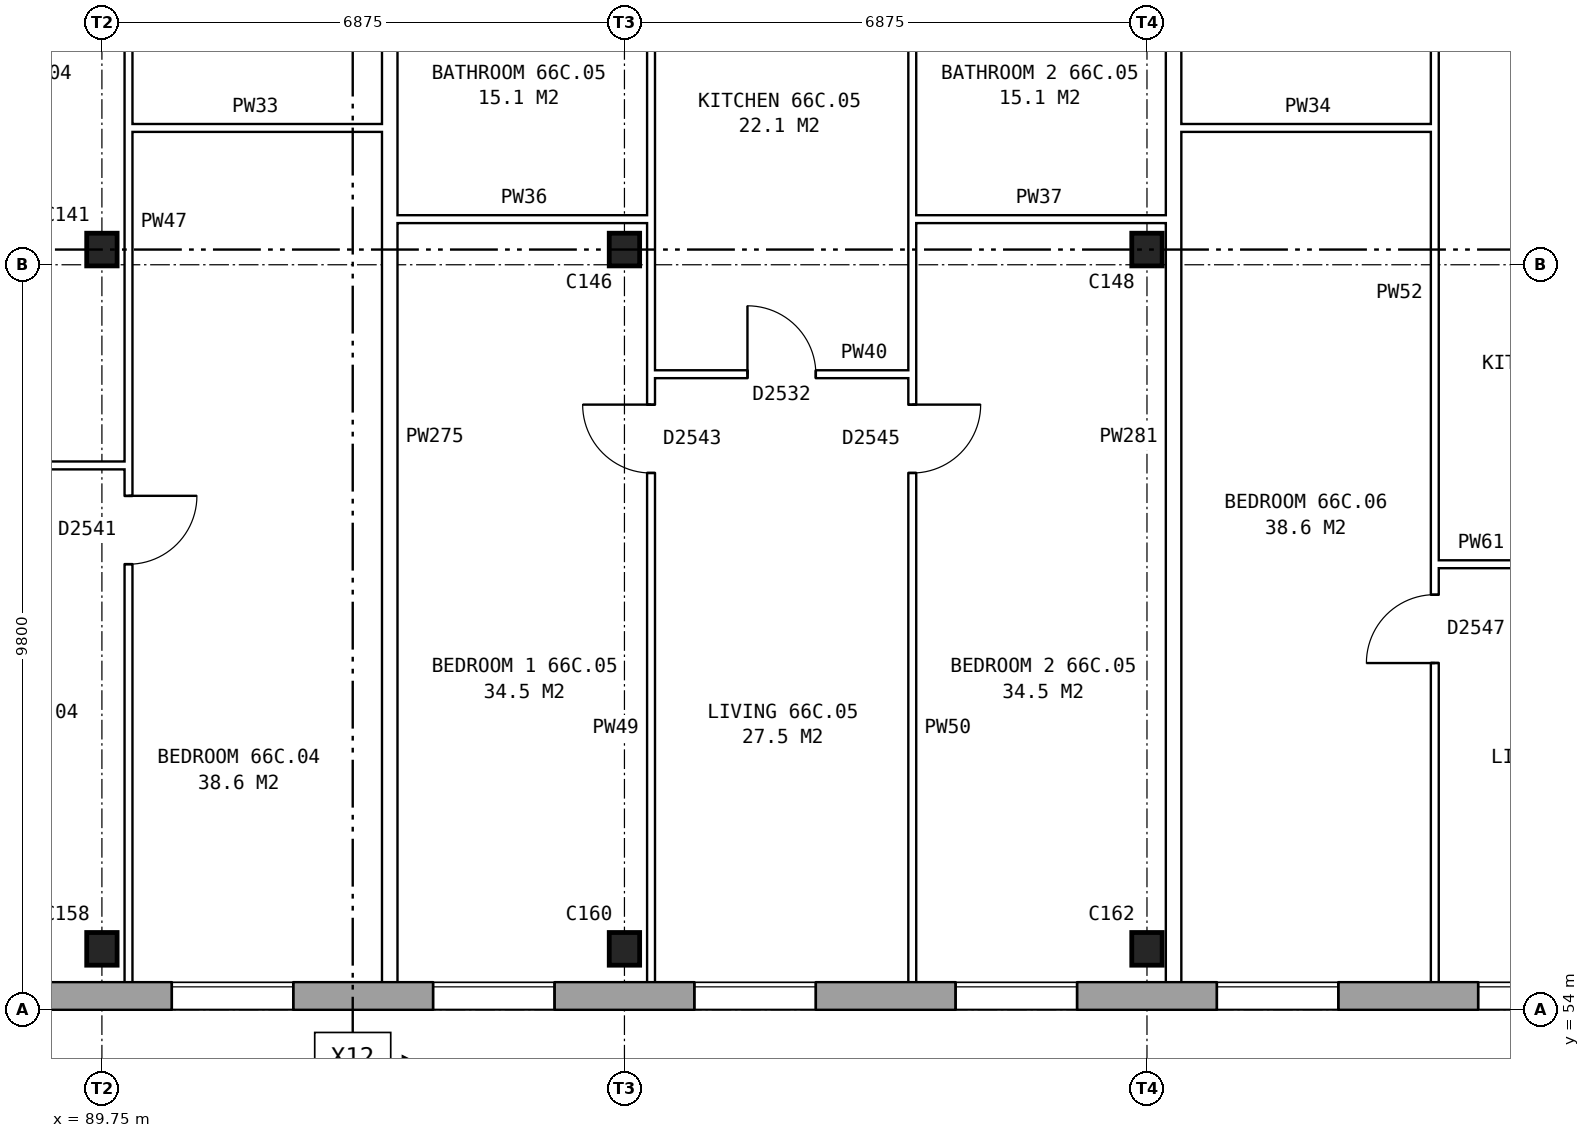
"""IFC4 building model, lengths in metres.
Left out: names, types, materials, properties, quantities, classifications, styles, units other than length and angle.
Written with IfcOpenShell. Run it as: python <this file> out.ifc"""

import sys

from ifc_helpers import new_model, si_unit, direction, frame, frame_2d, origin, origin_2d, place, context, subcontext, project, spatial, rectangle, i_section, extrude, element, fill, save


model = new_model("IFC4")
c1 = context("Model", 3, precision=1e-05, world=origin(), true_north=direction((0.0, 1.0)))
c2 = subcontext(c1, "Body", "Model", "MODEL_VIEW")
j1 = project(units=[si_unit("LENGTHUNIT", "METRE"), si_unit("PLANEANGLEUNIT", "RADIAN")], contexts=[c1])
p1 = place(None, origin())
s1 = spatial("IfcSite", under=j1, at=p1, CompositionType="ELEMENT")
p2 = place(p1, origin())
s2 = spatial("IfcBuilding", under=s1, at=p2, CompositionType="ELEMENT")
p3 = place(p2, frame((0.0, 0.0, 233.8)))
s3 = spatial("IfcBuildingStorey", under=s2, at=p3, CompositionType="ELEMENT", Elevation=233.8)
for number, where, z_axis, x_axis in (
    (1, (89.75, 54.8, 0.0), (0.0, 0.0, 1.0), (1.0, 0.0, 0.0)),
    (2, (96.625, 54.8, 0.0), (0.0, 0.0, 1.0), (1.0, 0.0, 0.0)),
    (3, (103.5, 54.8, 0.0), (0.0, 0.0, 1.0), (1.0, 0.0, 0.0)),
    (4, (89.75, 64.0, 0.0), (0.0, 0.0, 1.0), (1.0, 0.0, 0.0)),
    (5, (96.625, 64.0, 0.0), (0.0, 0.0, 1.0), (1.0, 0.0, 0.0)),
    (6, (103.5, 64.0, 0.0), (0.0, 0.0, 1.0), (1.0, 0.0, 0.0)),
):
    element("IfcColumn", number, at=place(p3, frame(where, z_axis=z_axis, x_axis=x_axis)), inside=s3, PredefinedType="COLUMN", context=c2, shape_type="SweptSolid", body=[
        extrude(i_section(OverallWidth=0.4, OverallDepth=0.43, WebThickness=0.028, FlangeThickness=0.04, at=origin_2d()), origin(), (0.0, 0.0, 1.0), 2.85),
    ])
p4 = place(p3, frame((75.95, 54.18, 0.0), z_axis=(0.0, 0.0, 1.0), x_axis=(1.0, 0.0, 0.0)))
e7 = element("IfcWall", 7, at=p4, inside=s3, PredefinedType="STANDARD", context=c2, shape_type="SweptSolid", body=[
    extrude(rectangle(XDim=55.1, YDim=0.36, at=frame_2d((27.55, 0.0))), origin(), (0.0, 0.0, 1.0), 2.85),
])
p5 = place(p4, frame((0.969, 0.0, 0.8)))
e8 = element("IfcOpeningElement", 8, at=p5, cuts=e7, PredefinedType="OPENING", context=c2, shape_type="SweptSolid", body=[
    extrude(rectangle(XDim=1.6, YDim=1.8, at=frame_2d((0.8, 0.9))), frame((0.0, 0.19, 0.0), z_axis=(0.0, -1.0, 0.0), x_axis=(1.0, 0.0, 0.0)), (0.0, 0.0, 1.0), 0.38),
])
p6 = place(p4, frame((4.406, 0.0, 0.8)))
e9 = element("IfcOpeningElement", 9, at=p6, cuts=e7, PredefinedType="OPENING", context=c2, shape_type="SweptSolid", body=[
    extrude(rectangle(XDim=1.6, YDim=1.8, at=frame_2d((0.8, 0.9))), frame((0.0, 0.19, 0.0), z_axis=(0.0, -1.0, 0.0), x_axis=(1.0, 0.0, 0.0)), (0.0, 0.0, 1.0), 0.38),
])
p7 = place(p4, frame((7.844, 0.0, 0.8)))
e10 = element("IfcOpeningElement", 10, at=p7, cuts=e7, PredefinedType="OPENING", context=c2, shape_type="SweptSolid", body=[
    extrude(rectangle(XDim=1.6, YDim=1.8, at=frame_2d((0.8, 0.9))), frame((0.0, 0.19, 0.0), z_axis=(0.0, -1.0, 0.0), x_axis=(1.0, 0.0, 0.0)), (0.0, 0.0, 1.0), 0.38),
])
p8 = place(p4, frame((11.281, 0.0, 0.8)))
e11 = element("IfcOpeningElement", 11, at=p8, cuts=e7, PredefinedType="OPENING", context=c2, shape_type="SweptSolid", body=[
    extrude(rectangle(XDim=1.6, YDim=1.8, at=frame_2d((0.8, 0.9))), frame((0.0, 0.19, 0.0), z_axis=(0.0, -1.0, 0.0), x_axis=(1.0, 0.0, 0.0)), (0.0, 0.0, 1.0), 0.38),
])
p9 = place(p4, frame((14.719, 0.0, 0.8)))
e12 = element("IfcOpeningElement", 12, at=p9, cuts=e7, PredefinedType="OPENING", context=c2, shape_type="SweptSolid", body=[
    extrude(rectangle(XDim=1.6, YDim=1.8, at=frame_2d((0.8, 0.9))), frame((0.0, 0.19, 0.0), z_axis=(0.0, -1.0, 0.0), x_axis=(1.0, 0.0, 0.0)), (0.0, 0.0, 1.0), 0.38),
])
p10 = place(p4, frame((18.156, 0.0, 0.8)))
e13 = element("IfcOpeningElement", 13, at=p10, cuts=e7, PredefinedType="OPENING", context=c2, shape_type="SweptSolid", body=[
    extrude(rectangle(XDim=1.6, YDim=1.8, at=frame_2d((0.8, 0.9))), frame((0.0, 0.19, 0.0), z_axis=(0.0, -1.0, 0.0), x_axis=(1.0, 0.0, 0.0)), (0.0, 0.0, 1.0), 0.38),
])
p11 = place(p4, frame((21.594, 0.0, 0.8)))
e14 = element("IfcOpeningElement", 14, at=p11, cuts=e7, PredefinedType="OPENING", context=c2, shape_type="SweptSolid", body=[
    extrude(rectangle(XDim=1.6, YDim=1.8, at=frame_2d((0.8, 0.9))), frame((0.0, 0.19, 0.0), z_axis=(0.0, -1.0, 0.0), x_axis=(1.0, 0.0, 0.0)), (0.0, 0.0, 1.0), 0.38),
])
p12 = place(p4, frame((25.031, 0.0, 0.8)))
e15 = element("IfcOpeningElement", 15, at=p12, cuts=e7, PredefinedType="OPENING", context=c2, shape_type="SweptSolid", body=[
    extrude(rectangle(XDim=1.6, YDim=1.8, at=frame_2d((0.8, 0.9))), frame((0.0, 0.19, 0.0), z_axis=(0.0, -1.0, 0.0), x_axis=(1.0, 0.0, 0.0)), (0.0, 0.0, 1.0), 0.38),
])
p13 = place(p4, frame((28.469, 0.0, 0.8)))
e16 = element("IfcOpeningElement", 16, at=p13, cuts=e7, PredefinedType="OPENING", context=c2, shape_type="SweptSolid", body=[
    extrude(rectangle(XDim=1.6, YDim=1.8, at=frame_2d((0.8, 0.9))), frame((0.0, 0.19, 0.0), z_axis=(0.0, -1.0, 0.0), x_axis=(1.0, 0.0, 0.0)), (0.0, 0.0, 1.0), 0.38),
])
p14 = place(p4, frame((31.906, 0.0, 0.8)))
e17 = element("IfcOpeningElement", 17, at=p14, cuts=e7, PredefinedType="OPENING", context=c2, shape_type="SweptSolid", body=[
    extrude(rectangle(XDim=1.6, YDim=1.8, at=frame_2d((0.8, 0.9))), frame((0.0, 0.19, 0.0), z_axis=(0.0, -1.0, 0.0), x_axis=(1.0, 0.0, 0.0)), (0.0, 0.0, 1.0), 0.38),
])
p15 = place(p4, frame((35.344, 0.0, 0.8)))
e18 = element("IfcOpeningElement", 18, at=p15, cuts=e7, PredefinedType="OPENING", context=c2, shape_type="SweptSolid", body=[
    extrude(rectangle(XDim=1.6, YDim=1.8, at=frame_2d((0.8, 0.9))), frame((0.0, 0.19, 0.0), z_axis=(0.0, -1.0, 0.0), x_axis=(1.0, 0.0, 0.0)), (0.0, 0.0, 1.0), 0.38),
])
p16 = place(p4, frame((38.781, 0.0, 0.8)))
e19 = element("IfcOpeningElement", 19, at=p16, cuts=e7, PredefinedType="OPENING", context=c2, shape_type="SweptSolid", body=[
    extrude(rectangle(XDim=1.6, YDim=1.8, at=frame_2d((0.8, 0.9))), frame((0.0, 0.19, 0.0), z_axis=(0.0, -1.0, 0.0), x_axis=(1.0, 0.0, 0.0)), (0.0, 0.0, 1.0), 0.38),
])
p17 = place(p4, frame((42.219, 0.0, 0.8)))
e20 = element("IfcOpeningElement", 20, at=p17, cuts=e7, PredefinedType="OPENING", context=c2, shape_type="SweptSolid", body=[
    extrude(rectangle(XDim=1.6, YDim=1.8, at=frame_2d((0.8, 0.9))), frame((0.0, 0.19, 0.0), z_axis=(0.0, -1.0, 0.0), x_axis=(1.0, 0.0, 0.0)), (0.0, 0.0, 1.0), 0.38),
])
p18 = place(p4, frame((45.656, 0.0, 0.8)))
e21 = element("IfcOpeningElement", 21, at=p18, cuts=e7, PredefinedType="OPENING", context=c2, shape_type="SweptSolid", body=[
    extrude(rectangle(XDim=1.6, YDim=1.8, at=frame_2d((0.8, 0.9))), frame((0.0, 0.19, 0.0), z_axis=(0.0, -1.0, 0.0), x_axis=(1.0, 0.0, 0.0)), (0.0, 0.0, 1.0), 0.38),
])
p19 = place(p4, frame((49.094, 0.0, 0.8)))
e22 = element("IfcOpeningElement", 22, at=p19, cuts=e7, PredefinedType="OPENING", context=c2, shape_type="SweptSolid", body=[
    extrude(rectangle(XDim=1.6, YDim=1.8, at=frame_2d((0.8, 0.9))), frame((0.0, 0.19, 0.0), z_axis=(0.0, -1.0, 0.0), x_axis=(1.0, 0.0, 0.0)), (0.0, 0.0, 1.0), 0.38),
])
p20 = place(p4, frame((52.531, 0.0, 0.8)))
e23 = element("IfcOpeningElement", 23, at=p20, cuts=e7, PredefinedType="OPENING", context=c2, shape_type="SweptSolid", body=[
    extrude(rectangle(XDim=1.6, YDim=1.8, at=frame_2d((0.8, 0.9))), frame((0.0, 0.19, 0.0), z_axis=(0.0, -1.0, 0.0), x_axis=(1.0, 0.0, 0.0)), (0.0, 0.0, 1.0), 0.38),
])
p21 = place(p3, frame((107.287, 59.86, 0.0), z_axis=(0.0, 0.0, 1.0), x_axis=(1.0, 0.0, 0.0)))
e24 = element("IfcWall", 24, at=p21, inside=s3, PredefinedType="PARTITIONING", context=c2, shape_type="SweptSolid", body=[
    extrude(rectangle(XDim=3.338, YDim=0.1, at=frame_2d((1.669, 0.0))), origin(), (0.0, 0.0, 1.0), 2.85),
])
p22 = place(p21, frame((1.219, 0.0, 0.0)))
e25 = element("IfcOpeningElement", 25, at=p22, cuts=e24, PredefinedType="OPENING", context=c2, shape_type="SweptSolid", body=[
    extrude(rectangle(XDim=0.9, YDim=2.1, at=frame_2d((0.45, 1.05))), frame((0.0, 0.06, 0.0), z_axis=(0.0, -1.0, 0.0), x_axis=(1.0, 0.0, 0.0)), (0.0, 0.0, 1.0), 0.12),
])
p23 = place(p3, frame((86.762, 61.16, 0.0), z_axis=(0.0, 0.0, 1.0), x_axis=(1.0, 0.0, 0.0)))
e26 = element("IfcWall", 26, at=p23, inside=s3, PredefinedType="PARTITIONING", context=c2, shape_type="SweptSolid", body=[
    extrude(rectangle(XDim=3.338, YDim=0.1, at=frame_2d((1.669, 0.0))), origin(), (0.0, 0.0, 1.0), 2.85),
])
p24 = place(p23, frame((1.219, 0.0, 0.0)))
e27 = element("IfcOpeningElement", 27, at=p24, cuts=e26, PredefinedType="OPENING", context=c2, shape_type="SweptSolid", body=[
    extrude(rectangle(XDim=0.9, YDim=2.1, at=frame_2d((0.45, 1.05))), frame((0.0, 0.06, 0.0), z_axis=(0.0, -1.0, 0.0), x_axis=(1.0, 0.0, 0.0)), (0.0, 0.0, 1.0), 0.12),
])
p25 = place(p3, frame((96.975, 62.36, 0.0), z_axis=(0.0, 0.0, 1.0), x_axis=(1.0, 0.0, 0.0)))
e28 = element("IfcWall", 28, at=p25, inside=s3, PredefinedType="PARTITIONING", context=c2, shape_type="SweptSolid", body=[
    extrude(rectangle(XDim=3.437, YDim=0.1, at=frame_2d((1.719, 0.0))), origin(), (0.0, 0.0, 1.0), 2.85),
])
p26 = place(p25, frame((1.269, 0.0, 0.0)))
e29 = element("IfcOpeningElement", 29, at=p26, cuts=e28, PredefinedType="OPENING", context=c2, shape_type="SweptSolid", body=[
    extrude(rectangle(XDim=0.9, YDim=2.1, at=frame_2d((0.45, 1.05))), frame((0.0, 0.06, 0.0), z_axis=(0.0, -1.0, 0.0), x_axis=(1.0, 0.0, 0.0)), (0.0, 0.0, 1.0), 0.12),
])
p27 = place(p3, frame((93.637, 64.4, 0.0), z_axis=(0.0, 0.0, 1.0), x_axis=(1.0, 0.0, 0.0)))
e30 = element("IfcWall", 30, at=p27, inside=s3, PredefinedType="PARTITIONING", context=c2, shape_type="SweptSolid", body=[
    extrude(rectangle(XDim=3.338, YDim=0.1, at=frame_2d((1.669, 0.0))), origin(), (0.0, 0.0, 1.0), 2.85),
])
p28 = place(p3, frame((100.412, 64.4, 0.0), z_axis=(0.0, 0.0, 1.0), x_axis=(1.0, 0.0, 0.0)))
e31 = element("IfcWall", 31, at=p28, inside=s3, PredefinedType="PARTITIONING", context=c2, shape_type="SweptSolid", body=[
    extrude(rectangle(XDim=3.338, YDim=0.1, at=frame_2d((1.669, 0.0))), origin(), (0.0, 0.0, 1.0), 2.85),
])
p29 = place(p3, frame((90.1, 65.6, 0.0), z_axis=(0.0, 0.0, 1.0), x_axis=(1.0, 0.0, 0.0)))
e32 = element("IfcWall", 32, at=p29, inside=s3, PredefinedType="PARTITIONING", context=c2, shape_type="SweptSolid", body=[
    extrude(rectangle(XDim=3.337, YDim=0.1, at=frame_2d((1.668, 0.0))), origin(), (0.0, 0.0, 1.0), 2.85),
])
p30 = place(p3, frame((103.95, 65.6, 0.0), z_axis=(0.0, 0.0, 1.0), x_axis=(1.0, 0.0, 0.0)))
e33 = element("IfcWall", 33, at=p30, inside=s3, PredefinedType="PARTITIONING", context=c2, shape_type="SweptSolid", body=[
    extrude(rectangle(XDim=3.337, YDim=0.1, at=frame_2d((1.668, 0.0))), origin(), (0.0, 0.0, 1.0), 2.85),
])
p31 = place(p3, frame((90.1, 54.36, 0.0), z_axis=(0.0, 0.0, 1.0), x_axis=(0.0, 1.0, 0.0)))
e34 = element("IfcWall", 34, at=p31, inside=s3, PredefinedType="PARTITIONING", context=c2, shape_type="SweptSolid", body=[
    extrude(rectangle(XDim=14.34, YDim=0.1, at=frame_2d((7.17, 0.0))), origin(), (0.0, 0.0, 1.0), 2.85),
])
p32 = place(p31, frame((5.5, 0.0, 0.0)))
e35 = element("IfcOpeningElement", 35, at=p32, cuts=e34, PredefinedType="OPENING", context=c2, shape_type="SweptSolid", body=[
    extrude(rectangle(XDim=0.9, YDim=2.1, at=frame_2d((0.45, 1.05))), frame((0.0, 0.06, 0.0), z_axis=(0.0, -1.0, 0.0), x_axis=(1.0, 0.0, 0.0)), (0.0, 0.0, 1.0), 0.12),
])
p33 = place(p31, frame((13.04, 0.0, 0.0)))
e36 = element("IfcOpeningElement", 36, at=p33, cuts=e34, PredefinedType="OPENING", context=c2, shape_type="SweptSolid", body=[
    extrude(rectangle(XDim=0.9, YDim=2.1, at=frame_2d((0.45, 1.05))), frame((0.0, 0.06, 0.0), z_axis=(0.0, -1.0, 0.0), x_axis=(1.0, 0.0, 0.0)), (0.0, 0.0, 1.0), 0.12),
])
p34 = place(p3, frame((93.537, 54.36, 0.0), z_axis=(0.0, 0.0, 1.0), x_axis=(0.0, 1.0, 0.0)))
e37 = element("IfcWall", 37, at=p34, inside=s3, PredefinedType="PARTITIONING", context=c2, shape_type="SweptSolid", body=[
    extrude(rectangle(XDim=14.34, YDim=0.2, at=frame_2d((7.17, 0.0))), origin(), (0.0, 0.0, 1.0), 2.85),
])
p35 = place(p3, frame((96.975, 54.36, 0.0), z_axis=(0.0, 0.0, 1.0), x_axis=(0.0, 1.0, 0.0)))
e38 = element("IfcWall", 38, at=p35, inside=s3, PredefinedType="PARTITIONING", context=c2, shape_type="SweptSolid", body=[
    extrude(rectangle(XDim=14.34, YDim=0.1, at=frame_2d((7.17, 0.0))), origin(), (0.0, 0.0, 1.0), 2.85),
])
p36 = place(p35, frame((6.7, 0.0, 0.0)))
e39 = element("IfcOpeningElement", 39, at=p36, cuts=e38, PredefinedType="OPENING", context=c2, shape_type="SweptSolid", body=[
    extrude(rectangle(XDim=0.9, YDim=2.1, at=frame_2d((0.45, 1.05))), frame((0.0, 0.06, 0.0), z_axis=(0.0, -1.0, 0.0), x_axis=(1.0, 0.0, 0.0)), (0.0, 0.0, 1.0), 0.12),
])
p37 = place(p35, frame((13.04, 0.0, 0.0)))
e40 = element("IfcOpeningElement", 40, at=p37, cuts=e38, PredefinedType="OPENING", context=c2, shape_type="SweptSolid", body=[
    extrude(rectangle(XDim=0.9, YDim=2.1, at=frame_2d((0.45, 1.05))), frame((0.0, 0.06, 0.0), z_axis=(0.0, -1.0, 0.0), x_axis=(1.0, 0.0, 0.0)), (0.0, 0.0, 1.0), 0.12),
])
p38 = place(p3, frame((100.412, 54.36, 0.0), z_axis=(0.0, 0.0, 1.0), x_axis=(0.0, 1.0, 0.0)))
e41 = element("IfcWall", 41, at=p38, inside=s3, PredefinedType="PARTITIONING", context=c2, shape_type="SweptSolid", body=[
    extrude(rectangle(XDim=14.34, YDim=0.1, at=frame_2d((7.17, 0.0))), origin(), (0.0, 0.0, 1.0), 2.85),
])
p39 = place(p38, frame((6.7, 0.0, 0.0)))
e42 = element("IfcOpeningElement", 42, at=p39, cuts=e41, PredefinedType="OPENING", context=c2, shape_type="SweptSolid", body=[
    extrude(rectangle(XDim=0.9, YDim=2.1, at=frame_2d((0.45, 1.05))), frame((0.0, 0.06, 0.0), z_axis=(0.0, -1.0, 0.0), x_axis=(1.0, 0.0, 0.0)), (0.0, 0.0, 1.0), 0.12),
])
p40 = place(p38, frame((13.04, 0.0, 0.0)))
e43 = element("IfcOpeningElement", 43, at=p40, cuts=e41, PredefinedType="OPENING", context=c2, shape_type="SweptSolid", body=[
    extrude(rectangle(XDim=0.9, YDim=2.1, at=frame_2d((0.45, 1.05))), frame((0.0, 0.06, 0.0), z_axis=(0.0, -1.0, 0.0), x_axis=(1.0, 0.0, 0.0)), (0.0, 0.0, 1.0), 0.12),
])
p41 = place(p3, frame((103.85, 54.36, 0.0), z_axis=(0.0, 0.0, 1.0), x_axis=(0.0, 1.0, 0.0)))
e44 = element("IfcWall", 44, at=p41, inside=s3, PredefinedType="PARTITIONING", context=c2, shape_type="SweptSolid", body=[
    extrude(rectangle(XDim=14.34, YDim=0.2, at=frame_2d((7.17, 0.0))), origin(), (0.0, 0.0, 1.0), 2.85),
])
p42 = place(p3, frame((107.287, 54.36, 0.0), z_axis=(0.0, 0.0, 1.0), x_axis=(0.0, 1.0, 0.0)))
e45 = element("IfcWall", 45, at=p42, inside=s3, PredefinedType="PARTITIONING", context=c2, shape_type="SweptSolid", body=[
    extrude(rectangle(XDim=14.34, YDim=0.1, at=frame_2d((7.17, 0.0))), origin(), (0.0, 0.0, 1.0), 2.85),
])
p43 = place(p42, frame((4.2, 0.0, 0.0)))
e46 = element("IfcOpeningElement", 46, at=p43, cuts=e45, PredefinedType="OPENING", context=c2, shape_type="SweptSolid", body=[
    extrude(rectangle(XDim=0.9, YDim=2.1, at=frame_2d((0.45, 1.05))), frame((0.0, 0.06, 0.0), z_axis=(0.0, -1.0, 0.0), x_axis=(1.0, 0.0, 0.0)), (0.0, 0.0, 1.0), 0.12),
])
p44 = place(p42, frame((13.04, 0.0, 0.0)))
e47 = element("IfcOpeningElement", 47, at=p44, cuts=e45, PredefinedType="OPENING", context=c2, shape_type="SweptSolid", body=[
    extrude(rectangle(XDim=0.9, YDim=2.1, at=frame_2d((0.45, 1.05))), frame((0.0, 0.06, 0.0), z_axis=(0.0, -1.0, 0.0), x_axis=(1.0, 0.0, 0.0)), (0.0, 0.0, 1.0), 0.12),
])
p45 = place(p9, origin())
e48 = element("IfcWindow", 48, at=p45, inside=s3, PartitioningType="SINGLE_PANEL", PredefinedType="WINDOW", context=c2, shape_type="SweptSolid", body=[
    extrude(rectangle(XDim=1.6, YDim=1.8, at=frame_2d((0.8, 0.9))), frame((0.0, 0.15, 0.0), z_axis=(0.0, -1.0, 0.0), x_axis=(1.0, 0.0, 0.0)), (0.0, 0.0, 1.0), 0.06),
])
fill(e12, e48)
p46 = place(p10, origin())
e49 = element("IfcWindow", 49, at=p46, inside=s3, PartitioningType="SINGLE_PANEL", PredefinedType="WINDOW", context=c2, shape_type="SweptSolid", body=[
    extrude(rectangle(XDim=1.6, YDim=1.8, at=frame_2d((0.8, 0.9))), frame((0.0, 0.15, 0.0), z_axis=(0.0, -1.0, 0.0), x_axis=(1.0, 0.0, 0.0)), (0.0, 0.0, 1.0), 0.06),
])
fill(e13, e49)
p47 = place(p11, origin())
e50 = element("IfcWindow", 50, at=p47, inside=s3, PartitioningType="SINGLE_PANEL", PredefinedType="WINDOW", context=c2, shape_type="SweptSolid", body=[
    extrude(rectangle(XDim=1.6, YDim=1.8, at=frame_2d((0.8, 0.9))), frame((0.0, 0.15, 0.0), z_axis=(0.0, -1.0, 0.0), x_axis=(1.0, 0.0, 0.0)), (0.0, 0.0, 1.0), 0.06),
])
fill(e14, e50)
p48 = place(p12, origin())
e51 = element("IfcWindow", 51, at=p48, inside=s3, PartitioningType="SINGLE_PANEL", PredefinedType="WINDOW", context=c2, shape_type="SweptSolid", body=[
    extrude(rectangle(XDim=1.6, YDim=1.8, at=frame_2d((0.8, 0.9))), frame((0.0, 0.15, 0.0), z_axis=(0.0, -1.0, 0.0), x_axis=(1.0, 0.0, 0.0)), (0.0, 0.0, 1.0), 0.06),
])
fill(e15, e51)
p49 = place(p13, origin())
e52 = element("IfcWindow", 52, at=p49, inside=s3, PartitioningType="SINGLE_PANEL", PredefinedType="WINDOW", context=c2, shape_type="SweptSolid", body=[
    extrude(rectangle(XDim=1.6, YDim=1.8, at=frame_2d((0.8, 0.9))), frame((0.0, 0.15, 0.0), z_axis=(0.0, -1.0, 0.0), x_axis=(1.0, 0.0, 0.0)), (0.0, 0.0, 1.0), 0.06),
])
fill(e16, e52)
p50 = place(p14, origin())
e53 = element("IfcWindow", 53, at=p50, inside=s3, PartitioningType="SINGLE_PANEL", PredefinedType="WINDOW", context=c2, shape_type="SweptSolid", body=[
    extrude(rectangle(XDim=1.6, YDim=1.8, at=frame_2d((0.8, 0.9))), frame((0.0, 0.15, 0.0), z_axis=(0.0, -1.0, 0.0), x_axis=(1.0, 0.0, 0.0)), (0.0, 0.0, 1.0), 0.06),
])
fill(e17, e53)
p51 = place(p32, frame((0.9, 0.0, 0.0), z_axis=(0.0, 0.0, 1.0), x_axis=(-1.0, 0.0, 0.0)))
e54 = element("IfcDoor", 54, at=p51, inside=s3, OperationType="SINGLE_SWING_LEFT", PredefinedType="DOOR", context=c2, shape_type="SweptSolid", body=[
    extrude(rectangle(XDim=0.9, YDim=2.1, at=frame_2d((0.45, 1.05))), frame((0.0, 0.025, 0.0), z_axis=(0.0, -1.0, 0.0), x_axis=(1.0, 0.0, 0.0)), (0.0, 0.0, 1.0), 0.05),
])
fill(e35, e54)
p52 = place(p36, origin())
e55 = element("IfcDoor", 55, at=p52, inside=s3, OperationType="SINGLE_SWING_RIGHT", PredefinedType="DOOR", context=c2, shape_type="SweptSolid", body=[
    extrude(rectangle(XDim=0.9, YDim=2.1, at=frame_2d((0.45, 1.05))), frame((0.0, 0.025, 0.0), z_axis=(0.0, -1.0, 0.0), x_axis=(1.0, 0.0, 0.0)), (0.0, 0.0, 1.0), 0.05),
])
fill(e39, e55)
p53 = place(p39, frame((0.9, 0.0, 0.0), z_axis=(0.0, 0.0, 1.0), x_axis=(-1.0, 0.0, 0.0)))
e56 = element("IfcDoor", 56, at=p53, inside=s3, OperationType="SINGLE_SWING_LEFT", PredefinedType="DOOR", context=c2, shape_type="SweptSolid", body=[
    extrude(rectangle(XDim=0.9, YDim=2.1, at=frame_2d((0.45, 1.05))), frame((0.0, 0.025, 0.0), z_axis=(0.0, -1.0, 0.0), x_axis=(1.0, 0.0, 0.0)), (0.0, 0.0, 1.0), 0.05),
])
fill(e42, e56)
p54 = place(p26, origin())
e57 = element("IfcDoor", 57, at=p54, inside=s3, OperationType="SINGLE_SWING_LEFT", PredefinedType="DOOR", context=c2, shape_type="SweptSolid", body=[
    extrude(rectangle(XDim=0.9, YDim=2.1, at=frame_2d((0.45, 1.05))), frame((0.0, 0.025, 0.0), z_axis=(0.0, -1.0, 0.0), x_axis=(1.0, 0.0, 0.0)), (0.0, 0.0, 1.0), 0.05),
])
fill(e29, e57)
p55 = place(p43, origin())
e58 = element("IfcDoor", 58, at=p55, inside=s3, OperationType="SINGLE_SWING_LEFT", PredefinedType="DOOR", context=c2, shape_type="SweptSolid", body=[
    extrude(rectangle(XDim=0.9, YDim=2.1, at=frame_2d((0.45, 1.05))), frame((0.0, 0.025, 0.0), z_axis=(0.0, -1.0, 0.0), x_axis=(1.0, 0.0, 0.0)), (0.0, 0.0, 1.0), 0.05),
])
fill(e46, e58)
save(model, sys.argv[1])
